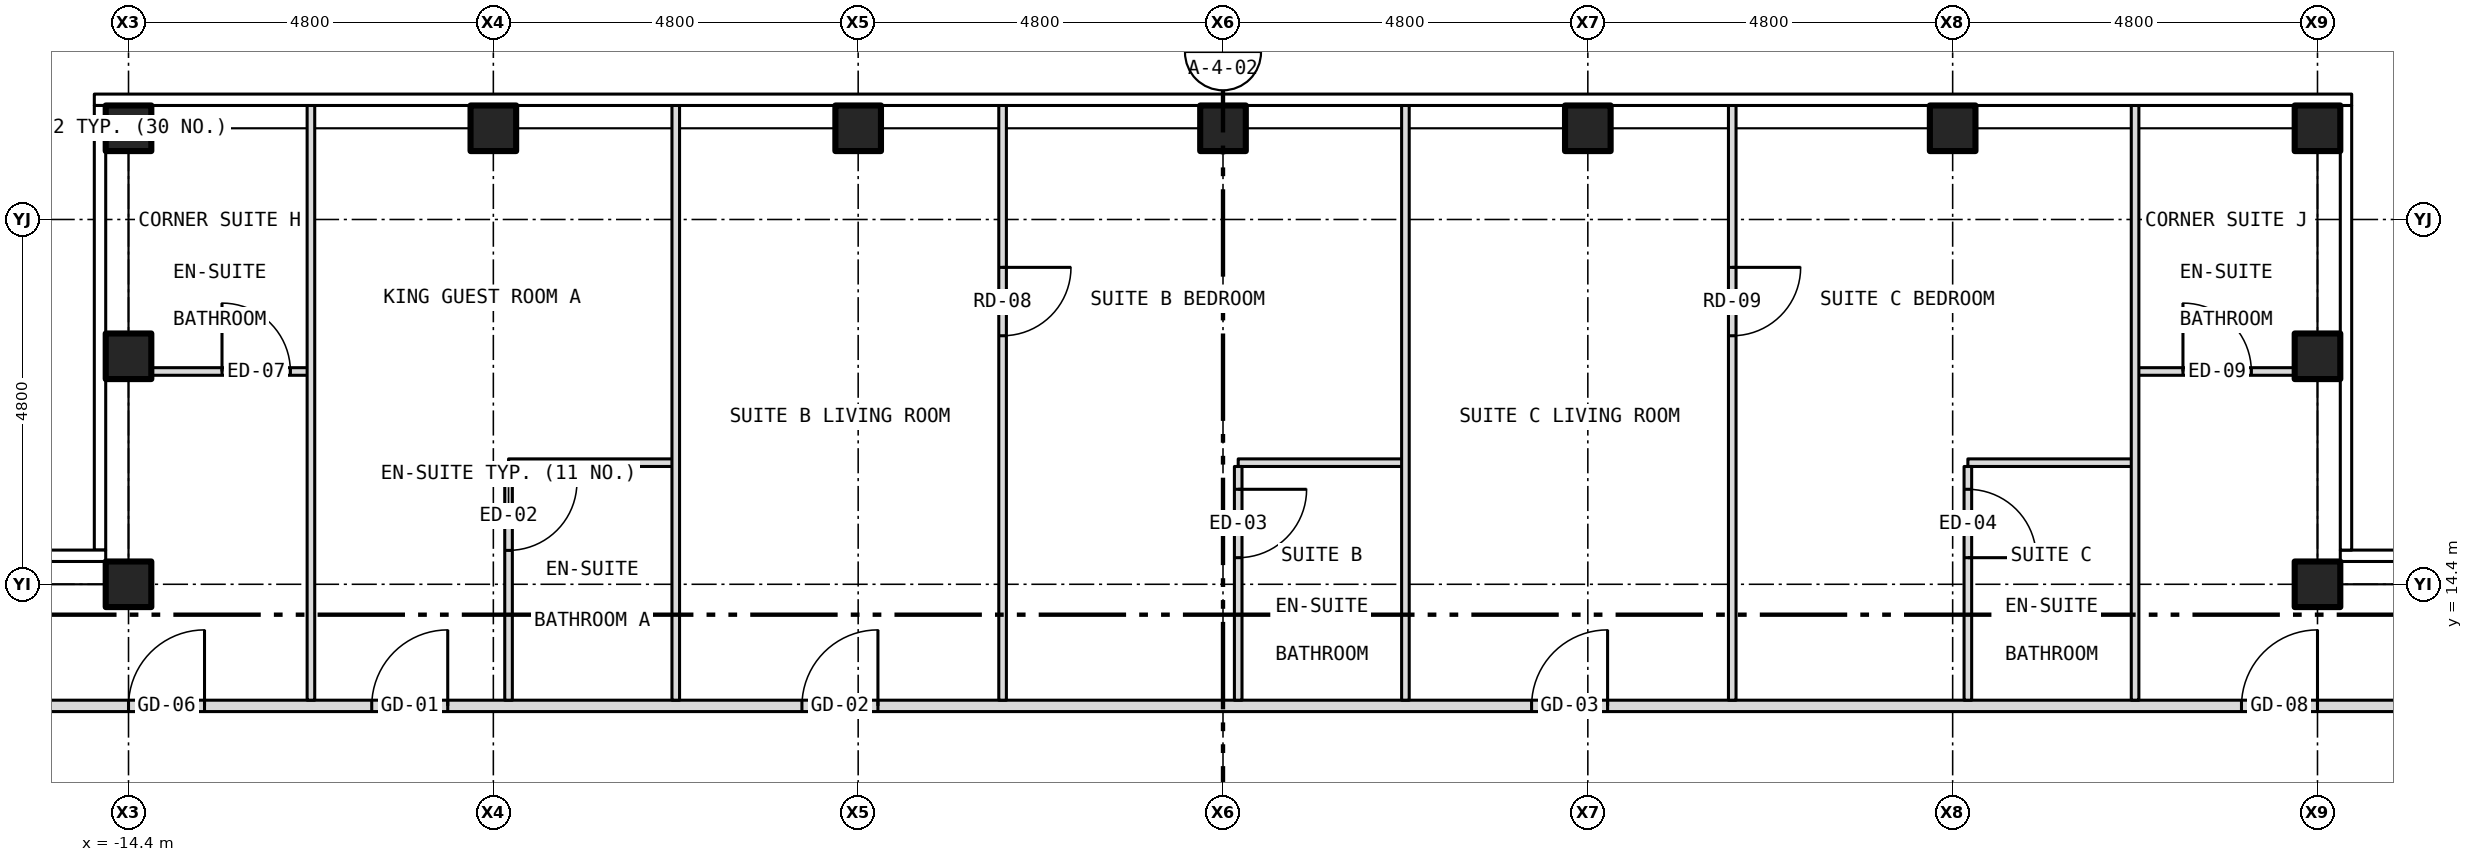
"""IFC4 building model, lengths in metres.
Left out: names, types, materials, properties, quantities, classifications, styles, units other than length and angle.
Written with IfcOpenShell. Run it as: python <this file> out.ifc"""

import sys

from ifc_helpers import new_model, si_unit, direction, frame, frame_2d, origin, origin_2d, place, context, subcontext, project, spatial, rectangle, hollow_rectangle, extrude, element, fill, save


model = new_model("IFC4")
c1 = context("Model", 3, precision=1e-05, world=origin(), true_north=direction((0.0, 1.0)))
c2 = subcontext(c1, "Body", "Model", "MODEL_VIEW")
j1 = project(units=[si_unit("LENGTHUNIT", "METRE"), si_unit("PLANEANGLEUNIT", "RADIAN")], contexts=[c1])
p1 = place(None, origin())
s1 = spatial("IfcSite", under=j1, at=p1, CompositionType="ELEMENT")
p2 = place(p1, origin())
s2 = spatial("IfcBuilding", under=s1, at=p2, CompositionType="ELEMENT")
p3 = place(p2, frame((0.0, 0.0, 255.0)))
s3 = spatial("IfcBuildingStorey", under=s2, at=p3, CompositionType="ELEMENT", Elevation=255.0)
for number, where, z_axis, x_axis in (
    (1, (-14.4, 20.4, -0.15), (0.0, 0.0, 1.0), (1.0, 0.0, 0.0)),
    (2, (-9.6, 20.4, -0.15), (0.0, 0.0, 1.0), (1.0, 0.0, 0.0)),
    (3, (-4.8, 20.4, -0.15), (0.0, 0.0, 1.0), (1.0, 0.0, 0.0)),
    (4, (0.0, 20.4, -0.15), (0.0, 0.0, 1.0), (1.0, 0.0, 0.0)),
    (5, (4.8, 20.4, -0.15), (0.0, 0.0, 1.0), (1.0, 0.0, 0.0)),
    (6, (9.6, 20.4, -0.15), (0.0, 0.0, 1.0), (1.0, 0.0, 0.0)),
    (7, (14.4, 20.4, -0.15), (0.0, 0.0, 1.0), (1.0, 0.0, 0.0)),
    (8, (-14.4, 14.4, -0.15), (0.0, 0.0, 1.0), (1.0, 0.0, 0.0)),
    (9, (-14.4, 17.4, -0.15), (0.0, 0.0, 1.0), (1.0, 0.0, 0.0)),
    (10, (14.4, 14.4, -0.15), (0.0, 0.0, 1.0), (1.0, 0.0, 0.0)),
    (11, (14.4, 17.4, -0.15), (0.0, 0.0, 1.0), (1.0, 0.0, 0.0)),
):
    element("IfcColumn", number, at=place(p3, frame(where, z_axis=z_axis, x_axis=x_axis)), inside=s3, PredefinedType="COLUMN", context=c2, shape_type="SweptSolid", body=[
        extrude(hollow_rectangle(XDim=0.6, YDim=0.6, WallThickness=0.03, at=origin_2d()), origin(), (0.0, 0.0, 1.0), 3.5),
    ])
p4 = place(p3, frame((-15.8, 12.8, 0.0), z_axis=(0.0, 0.0, 1.0), x_axis=(1.0, 0.0, 0.0)))
e12 = element("IfcWall", 12, at=p4, inside=s3, PredefinedType="PARTITIONING", context=c2, shape_type="SweptSolid", body=[
    extrude(rectangle(XDim=31.6, YDim=0.15, at=frame_2d((15.8, 0.0))), origin(), (0.0, 0.0, 1.0), 3.35),
])
p5 = place(p4, frame((4.6, 0.0, 0.0)))
e13 = element("IfcOpeningElement", 13, at=p5, cuts=e12, PredefinedType="OPENING", context=c2, shape_type="SweptSolid", body=[
    extrude(rectangle(XDim=1.0, YDim=2.1, at=frame_2d((0.5, 1.05))), frame((0.0, 0.087, 0.0), z_axis=(0.0, -1.0, 0.0), x_axis=(1.0, 0.0, 0.0)), (0.0, 0.0, 1.0), 0.174),
])
p6 = place(p4, frame((10.26, 0.0, 0.0)))
e14 = element("IfcOpeningElement", 14, at=p6, cuts=e12, PredefinedType="OPENING", context=c2, shape_type="SweptSolid", body=[
    extrude(rectangle(XDim=1.0, YDim=2.1, at=frame_2d((0.5, 1.05))), frame((0.0, 0.087, 0.0), z_axis=(0.0, -1.0, 0.0), x_axis=(1.0, 0.0, 0.0)), (0.0, 0.0, 1.0), 0.174),
])
p7 = place(p4, frame((19.86, 0.0, 0.0)))
e15 = element("IfcOpeningElement", 15, at=p7, cuts=e12, PredefinedType="OPENING", context=c2, shape_type="SweptSolid", body=[
    extrude(rectangle(XDim=1.0, YDim=2.1, at=frame_2d((0.5, 1.05))), frame((0.0, 0.087, 0.0), z_axis=(0.0, -1.0, 0.0), x_axis=(1.0, 0.0, 0.0)), (0.0, 0.0, 1.0), 0.174),
])
p8 = place(p4, frame((1.4, 0.0, 0.0)))
e16 = element("IfcOpeningElement", 16, at=p8, cuts=e12, PredefinedType="OPENING", context=c2, shape_type="SweptSolid", body=[
    extrude(rectangle(XDim=1.0, YDim=2.1, at=frame_2d((0.5, 1.05))), frame((0.0, 0.087, 0.0), z_axis=(0.0, -1.0, 0.0), x_axis=(1.0, 0.0, 0.0)), (0.0, 0.0, 1.0), 0.174),
])
p9 = place(p4, frame((29.2, 0.0, 0.0)))
e17 = element("IfcOpeningElement", 17, at=p9, cuts=e12, PredefinedType="OPENING", context=c2, shape_type="SweptSolid", body=[
    extrude(rectangle(XDim=1.0, YDim=2.1, at=frame_2d((0.5, 1.05))), frame((0.0, 0.087, 0.0), z_axis=(0.0, -1.0, 0.0), x_axis=(1.0, 0.0, 0.0)), (0.0, 0.0, 1.0), 0.174),
])
for number, where, z_axis, x_axis in (
    (18, (-9.4, 16.0, 0.0), (0.0, 0.0, 1.0), (1.0, 0.0, 0.0)),
    (19, (0.2, 16.0, 0.0), (0.0, 0.0, 1.0), (1.0, 0.0, 0.0)),
    (20, (9.8, 16.0, 0.0), (0.0, 0.0, 1.0), (1.0, 0.0, 0.0)),
):
    element("IfcWall", number, at=place(p3, frame(where, z_axis=z_axis, x_axis=x_axis)), inside=s3, PredefinedType="PARTITIONING", context=c2, shape_type="SweptSolid", body=[
        extrude(rectangle(XDim=2.2, YDim=0.1, at=frame_2d((1.1, 0.0))), origin(), (0.0, 0.0, 1.0), 3.35),
    ])
p10 = place(p3, frame((-14.28, 17.2, 0.0), z_axis=(0.0, 0.0, 1.0), x_axis=(1.0, 0.0, 0.0)))
e21 = element("IfcWall", 21, at=p10, inside=s3, PredefinedType="PARTITIONING", context=c2, shape_type="SweptSolid", body=[
    extrude(rectangle(XDim=2.28, YDim=0.1, at=frame_2d((1.14, 0.0))), origin(), (0.0, 0.0, 1.0), 3.35),
])
p11 = place(p10, frame((1.11, 0.0, 0.0)))
e22 = element("IfcOpeningElement", 22, at=p11, cuts=e21, PredefinedType="OPENING", context=c2, shape_type="SweptSolid", body=[
    extrude(rectangle(XDim=0.9, YDim=2.1, at=frame_2d((0.45, 1.05))), frame((0.0, 0.062, 0.0), z_axis=(0.0, -1.0, 0.0), x_axis=(1.0, 0.0, 0.0)), (0.0, 0.0, 1.0), 0.124),
])
p12 = place(p3, frame((12.0, 17.2, 0.0), z_axis=(0.0, 0.0, 1.0), x_axis=(1.0, 0.0, 0.0)))
e23 = element("IfcWall", 23, at=p12, inside=s3, PredefinedType="PARTITIONING", context=c2, shape_type="SweptSolid", body=[
    extrude(rectangle(XDim=2.28, YDim=0.1, at=frame_2d((1.14, 0.0))), origin(), (0.0, 0.0, 1.0), 3.35),
])
p13 = place(p12, frame((0.63, 0.0, 0.0)))
e24 = element("IfcOpeningElement", 24, at=p13, cuts=e23, PredefinedType="OPENING", context=c2, shape_type="SweptSolid", body=[
    extrude(rectangle(XDim=0.9, YDim=2.1, at=frame_2d((0.45, 1.05))), frame((0.0, 0.062, 0.0), z_axis=(0.0, -1.0, 0.0), x_axis=(1.0, 0.0, 0.0)), (0.0, 0.0, 1.0), 0.124),
])
p14 = place(p3, frame((-12.0, 12.875, 0.0), z_axis=(0.0, 0.0, 1.0), x_axis=(0.0, 1.0, 0.0)))
e25 = element("IfcWall", 25, at=p14, inside=s3, PredefinedType="PARTITIONING", context=c2, shape_type="SweptSolid", body=[
    extrude(rectangle(XDim=7.855, YDim=0.1, at=frame_2d((3.927, 0.0))), origin(), (0.0, 0.0, 1.0), 3.35),
])
p15 = place(p3, frame((-9.4, 12.875, 0.0), z_axis=(0.0, 0.0, 1.0), x_axis=(0.0, 1.0, 0.0)))
e26 = element("IfcWall", 26, at=p15, inside=s3, PredefinedType="PARTITIONING", context=c2, shape_type="SweptSolid", body=[
    extrude(rectangle(XDim=3.075, YDim=0.1, at=frame_2d((1.538, 0.0))), origin(), (0.0, 0.0, 1.0), 2.728),
])
p16 = place(p15, frame((1.971, 0.0, 0.0)))
e27 = element("IfcOpeningElement", 27, at=p16, cuts=e26, PredefinedType="OPENING", context=c2, shape_type="SweptSolid", body=[
    extrude(rectangle(XDim=0.9, YDim=2.1, at=frame_2d((0.45, 1.05))), frame((0.0, 0.062, 0.0), z_axis=(0.0, -1.0, 0.0), x_axis=(1.0, 0.0, 0.0)), (0.0, 0.0, 1.0), 0.124),
])
p17 = place(p3, frame((-7.2, 12.875, 0.0), z_axis=(0.0, 0.0, 1.0), x_axis=(0.0, 1.0, 0.0)))
e28 = element("IfcWall", 28, at=p17, inside=s3, PredefinedType="PARTITIONING", context=c2, shape_type="SweptSolid", body=[
    extrude(rectangle(XDim=7.855, YDim=0.1, at=frame_2d((3.927, 0.0))), origin(), (0.0, 0.0, 1.0), 3.35),
])
p18 = place(p3, frame((-2.9, 12.875, 0.0), z_axis=(0.0, 0.0, 1.0), x_axis=(0.0, 1.0, 0.0)))
e29 = element("IfcWall", 29, at=p18, inside=s3, PredefinedType="PARTITIONING", context=c2, shape_type="SweptSolid", body=[
    extrude(rectangle(XDim=7.855, YDim=0.1, at=frame_2d((3.927, 0.0))), origin(), (0.0, 0.0, 1.0), 3.35),
])
p19 = place(p18, frame((4.795, 0.0, 0.0)))
e30 = element("IfcOpeningElement", 30, at=p19, cuts=e29, PredefinedType="OPENING", context=c2, shape_type="SweptSolid", body=[
    extrude(rectangle(XDim=0.9, YDim=2.1, at=frame_2d((0.45, 1.05))), frame((0.0, 0.062, 0.0), z_axis=(0.0, -1.0, 0.0), x_axis=(1.0, 0.0, 0.0)), (0.0, 0.0, 1.0), 0.124),
])
p20 = place(p3, frame((0.2, 12.875, 0.0), z_axis=(0.0, 0.0, 1.0), x_axis=(0.0, 1.0, 0.0)))
e31 = element("IfcWall", 31, at=p20, inside=s3, PredefinedType="PARTITIONING", context=c2, shape_type="SweptSolid", body=[
    extrude(rectangle(XDim=3.075, YDim=0.1, at=frame_2d((1.538, 0.0))), origin(), (0.0, 0.0, 1.0), 2.728),
])
p21 = place(p20, frame((1.875, 0.0, 0.0)))
e32 = element("IfcOpeningElement", 32, at=p21, cuts=e31, PredefinedType="OPENING", context=c2, shape_type="SweptSolid", body=[
    extrude(rectangle(XDim=0.9, YDim=2.1, at=frame_2d((0.45, 1.05))), frame((0.0, 0.062, 0.0), z_axis=(0.0, -1.0, 0.0), x_axis=(1.0, 0.0, 0.0)), (0.0, 0.0, 1.0), 0.124),
])
p22 = place(p3, frame((2.4, 12.875, 0.0), z_axis=(0.0, 0.0, 1.0), x_axis=(0.0, 1.0, 0.0)))
e33 = element("IfcWall", 33, at=p22, inside=s3, PredefinedType="PARTITIONING", context=c2, shape_type="SweptSolid", body=[
    extrude(rectangle(XDim=7.855, YDim=0.1, at=frame_2d((3.927, 0.0))), origin(), (0.0, 0.0, 1.0), 3.35),
])
p23 = place(p3, frame((6.7, 12.875, 0.0), z_axis=(0.0, 0.0, 1.0), x_axis=(0.0, 1.0, 0.0)))
e34 = element("IfcWall", 34, at=p23, inside=s3, PredefinedType="PARTITIONING", context=c2, shape_type="SweptSolid", body=[
    extrude(rectangle(XDim=7.855, YDim=0.1, at=frame_2d((3.927, 0.0))), origin(), (0.0, 0.0, 1.0), 3.35),
])
p24 = place(p23, frame((4.795, 0.0, 0.0)))
e35 = element("IfcOpeningElement", 35, at=p24, cuts=e34, PredefinedType="OPENING", context=c2, shape_type="SweptSolid", body=[
    extrude(rectangle(XDim=0.9, YDim=2.1, at=frame_2d((0.45, 1.05))), frame((0.0, 0.062, 0.0), z_axis=(0.0, -1.0, 0.0), x_axis=(1.0, 0.0, 0.0)), (0.0, 0.0, 1.0), 0.124),
])
p25 = place(p3, frame((9.8, 12.875, 0.0), z_axis=(0.0, 0.0, 1.0), x_axis=(0.0, 1.0, 0.0)))
e36 = element("IfcWall", 36, at=p25, inside=s3, PredefinedType="PARTITIONING", context=c2, shape_type="SweptSolid", body=[
    extrude(rectangle(XDim=3.075, YDim=0.1, at=frame_2d((1.538, 0.0))), origin(), (0.0, 0.0, 1.0), 2.728),
])
p26 = place(p25, frame((1.875, 0.0, 0.0)))
e37 = element("IfcOpeningElement", 37, at=p26, cuts=e36, PredefinedType="OPENING", context=c2, shape_type="SweptSolid", body=[
    extrude(rectangle(XDim=0.9, YDim=2.1, at=frame_2d((0.45, 1.05))), frame((0.0, 0.062, 0.0), z_axis=(0.0, -1.0, 0.0), x_axis=(1.0, 0.0, 0.0)), (0.0, 0.0, 1.0), 0.124),
])
p27 = place(p3, frame((12.0, 12.875, 0.0), z_axis=(0.0, 0.0, 1.0), x_axis=(0.0, 1.0, 0.0)))
e38 = element("IfcWall", 38, at=p27, inside=s3, PredefinedType="PARTITIONING", context=c2, shape_type="SweptSolid", body=[
    extrude(rectangle(XDim=7.855, YDim=0.1, at=frame_2d((3.927, 0.0))), origin(), (0.0, 0.0, 1.0), 3.35),
])
p28 = place(p5, origin())
e39 = element("IfcDoor", 39, at=p28, inside=s3, OperationType="SINGLE_SWING_RIGHT", PredefinedType="DOOR", context=c2, shape_type="SweptSolid", body=[
    extrude(rectangle(XDim=1.0, YDim=2.1, at=frame_2d((0.5, 1.05))), frame((0.0, 0.025, 0.0), z_axis=(0.0, -1.0, 0.0), x_axis=(1.0, 0.0, 0.0)), (0.0, 0.0, 1.0), 0.05),
])
fill(e13, e39)
p29 = place(p16, origin())
e40 = element("IfcDoor", 40, at=p29, inside=s3, OperationType="SINGLE_SWING_RIGHT", PredefinedType="DOOR", context=c2, shape_type="SweptSolid", body=[
    extrude(rectangle(XDim=0.9, YDim=2.1, at=frame_2d((0.45, 1.05))), frame((0.0, 0.025, 0.0), z_axis=(0.0, -1.0, 0.0), x_axis=(1.0, 0.0, 0.0)), (0.0, 0.0, 1.0), 0.05),
])
fill(e27, e40)
p30 = place(p6, origin())
e41 = element("IfcDoor", 41, at=p30, inside=s3, OperationType="SINGLE_SWING_RIGHT", PredefinedType="DOOR", context=c2, shape_type="SweptSolid", body=[
    extrude(rectangle(XDim=1.0, YDim=2.1, at=frame_2d((0.5, 1.05))), frame((0.0, 0.025, 0.0), z_axis=(0.0, -1.0, 0.0), x_axis=(1.0, 0.0, 0.0)), (0.0, 0.0, 1.0), 0.05),
])
fill(e14, e41)
p31 = place(p19, origin())
e42 = element("IfcDoor", 42, at=p31, inside=s3, OperationType="SINGLE_SWING_RIGHT", PredefinedType="DOOR", context=c2, shape_type="SweptSolid", body=[
    extrude(rectangle(XDim=0.9, YDim=2.1, at=frame_2d((0.45, 1.05))), frame((0.0, 0.025, 0.0), z_axis=(0.0, -1.0, 0.0), x_axis=(1.0, 0.0, 0.0)), (0.0, 0.0, 1.0), 0.05),
])
fill(e30, e42)
p32 = place(p21, origin())
e43 = element("IfcDoor", 43, at=p32, inside=s3, OperationType="SINGLE_SWING_RIGHT", PredefinedType="DOOR", context=c2, shape_type="SweptSolid", body=[
    extrude(rectangle(XDim=0.9, YDim=2.1, at=frame_2d((0.45, 1.05))), frame((0.0, 0.025, 0.0), z_axis=(0.0, -1.0, 0.0), x_axis=(1.0, 0.0, 0.0)), (0.0, 0.0, 1.0), 0.05),
])
fill(e32, e43)
p33 = place(p7, origin())
e44 = element("IfcDoor", 44, at=p33, inside=s3, OperationType="SINGLE_SWING_RIGHT", PredefinedType="DOOR", context=c2, shape_type="SweptSolid", body=[
    extrude(rectangle(XDim=1.0, YDim=2.1, at=frame_2d((0.5, 1.05))), frame((0.0, 0.025, 0.0), z_axis=(0.0, -1.0, 0.0), x_axis=(1.0, 0.0, 0.0)), (0.0, 0.0, 1.0), 0.05),
])
fill(e15, e44)
p34 = place(p24, origin())
e45 = element("IfcDoor", 45, at=p34, inside=s3, OperationType="SINGLE_SWING_RIGHT", PredefinedType="DOOR", context=c2, shape_type="SweptSolid", body=[
    extrude(rectangle(XDim=0.9, YDim=2.1, at=frame_2d((0.45, 1.05))), frame((0.0, 0.025, 0.0), z_axis=(0.0, -1.0, 0.0), x_axis=(1.0, 0.0, 0.0)), (0.0, 0.0, 1.0), 0.05),
])
fill(e35, e45)
p35 = place(p26, origin())
e46 = element("IfcDoor", 46, at=p35, inside=s3, OperationType="SINGLE_SWING_LEFT", PredefinedType="DOOR", context=c2, shape_type="SweptSolid", body=[
    extrude(rectangle(XDim=0.9, YDim=2.1, at=frame_2d((0.45, 1.05))), frame((0.0, 0.025, 0.0), z_axis=(0.0, -1.0, 0.0), x_axis=(1.0, 0.0, 0.0)), (0.0, 0.0, 1.0), 0.05),
])
fill(e37, e46)
p36 = place(p11, origin())
e47 = element("IfcDoor", 47, at=p36, inside=s3, OperationType="SINGLE_SWING_LEFT", PredefinedType="DOOR", context=c2, shape_type="SweptSolid", body=[
    extrude(rectangle(XDim=0.9, YDim=2.1, at=frame_2d((0.45, 1.05))), frame((0.0, 0.025, 0.0), z_axis=(0.0, -1.0, 0.0), x_axis=(1.0, 0.0, 0.0)), (0.0, 0.0, 1.0), 0.05),
])
fill(e22, e47)
p37 = place(p8, origin())
e48 = element("IfcDoor", 48, at=p37, inside=s3, OperationType="SINGLE_SWING_RIGHT", PredefinedType="DOOR", context=c2, shape_type="SweptSolid", body=[
    extrude(rectangle(XDim=1.0, YDim=2.1, at=frame_2d((0.5, 1.05))), frame((0.0, 0.025, 0.0), z_axis=(0.0, -1.0, 0.0), x_axis=(1.0, 0.0, 0.0)), (0.0, 0.0, 1.0), 0.05),
])
fill(e16, e48)
p38 = place(p13, origin())
e49 = element("IfcDoor", 49, at=p38, inside=s3, OperationType="SINGLE_SWING_LEFT", PredefinedType="DOOR", context=c2, shape_type="SweptSolid", body=[
    extrude(rectangle(XDim=0.9, YDim=2.1, at=frame_2d((0.45, 1.05))), frame((0.0, 0.025, 0.0), z_axis=(0.0, -1.0, 0.0), x_axis=(1.0, 0.0, 0.0)), (0.0, 0.0, 1.0), 0.05),
])
fill(e24, e49)
p39 = place(p9, origin())
e50 = element("IfcDoor", 50, at=p39, inside=s3, OperationType="SINGLE_SWING_RIGHT", PredefinedType="DOOR", context=c2, shape_type="SweptSolid", body=[
    extrude(rectangle(XDim=1.0, YDim=2.1, at=frame_2d((0.5, 1.05))), frame((0.0, 0.025, 0.0), z_axis=(0.0, -1.0, 0.0), x_axis=(1.0, 0.0, 0.0)), (0.0, 0.0, 1.0), 0.05),
])
fill(e17, e50)
save(model, sys.argv[1])
